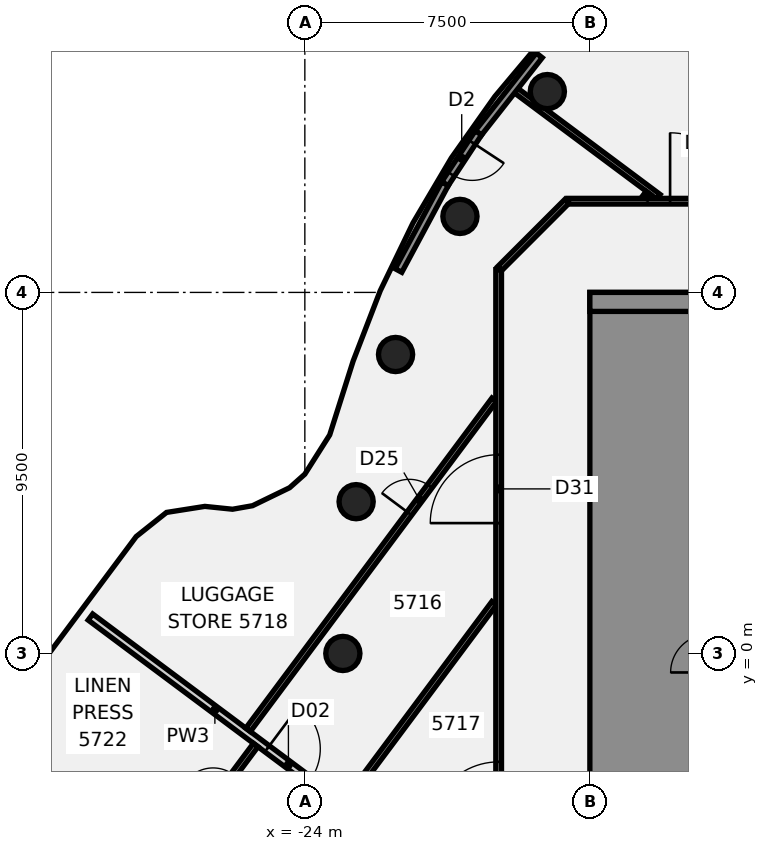
"""IFC4 building model, lengths in metres.
Left out: names, types, materials, properties, quantities, classifications, styles, units other than length and angle.
Written with IfcOpenShell. Run it as: python <this file> out.ifc"""

import sys

from ifc_helpers import new_model, si_unit, direction, frame, frame_2d, origin, origin_2d, place, context, subcontext, project, spatial, polyline, rectangle, circle, outline, extrude, element, fill, save


model = new_model("IFC4")
c1 = context("Model", 3, precision=1e-05, world=origin(), true_north=direction((0.0, 1.0)))
c2 = subcontext(c1, "Body", "Model", "MODEL_VIEW")
j1 = project(units=[si_unit("LENGTHUNIT", "METRE"), si_unit("PLANEANGLEUNIT", "RADIAN")], contexts=[c1])
p1 = place(None, origin())
s1 = spatial("IfcSite", under=j1, at=p1, CompositionType="ELEMENT")
p2 = place(p1, origin())
s2 = spatial("IfcBuilding", under=s1, at=p2, CompositionType="ELEMENT")
p3 = place(p2, frame((0.0, 0.0, 227.1)))
s3 = spatial("IfcBuildingStorey", under=s2, at=p3, CompositionType="ELEMENT", Elevation=227.1)
for number, where, z_axis, x_axis in (
    (1, (-17.619, 14.784, -0.14), (0.0, 0.0, 1.0), (1.0, 0.0, 0.0)),
    (2, (-19.919, 11.5, -0.14), (0.0, 0.0, 1.0), (1.0, 0.0, 0.0)),
    (3, (-21.613, 7.866, -0.14), (0.0, 0.0, 1.0), (1.0, 0.0, 0.0)),
    (4, (-22.651, 3.994, -0.14), (0.0, 0.0, 1.0), (1.0, 0.0, 0.0)),
    (5, (-23.0, 0.0, -0.14), (0.0, 0.0, 1.0), (1.0, 0.0, 0.0)),
):
    element("IfcColumn", number, at=place(p3, frame(where, z_axis=z_axis, x_axis=x_axis)), inside=s3, PredefinedType="COLUMN", context=c2, shape_type="SweptSolid", body=[
        extrude(circle(Radius=0.45, at=origin_2d()), origin(), (0.0, 0.0, 1.0), 3.6),
    ])
p4 = place(p3, frame((-29.642, 0.958, 0.0), z_axis=(0.0, 0.0, 1.0), x_axis=(0.801632086485, -0.597817696224, 0.0)))
e6 = element("IfcWall", 6, at=p4, inside=s3, PredefinedType="PARTITIONING", context=c2, shape_type="SweptSolid", body=[
    extrude(rectangle(XDim=8.171, YDim=0.2, at=frame_2d((4.085, 0.0))), origin(), (0.0, 0.0, 1.0), 2.864),
])
p5 = place(p4, frame((5.799, 0.0, 0.0)))
e7 = element("IfcOpeningElement", 7, at=p5, cuts=e6, PredefinedType="OPENING", context=c2, shape_type="SweptSolid", body=[
    extrude(rectangle(XDim=1.4, YDim=2.1, at=frame_2d((0.7, 1.05))), frame((0.0, 0.11, 0.0), z_axis=(0.0, -1.0, 0.0), x_axis=(1.0, 0.0, 0.0)), (0.0, 0.0, 1.0), 0.22),
])
p6 = place(p3, frame((-18.463, 14.827, 0.0), z_axis=(0.0, 0.0, 1.0), x_axis=(0.801555334436, -0.597920601617, 0.0)))
e8 = element("IfcWall", 8, at=p6, inside=s3, PredefinedType="PARTITIONING", context=c2, shape_type="SweptSolid", body=[
    extrude(rectangle(XDim=4.701, YDim=0.15, at=frame_2d((2.351, 0.0))), origin(), (0.0, 0.0, 1.0), 2.864),
])
p7 = place(p3, frame((-17.065, 11.9, 0.0), z_axis=(0.0, 0.0, 1.0), x_axis=(1.0, 0.0, 0.0)))
e9 = element("IfcWall", 9, at=p7, inside=s3, PredefinedType="PARTITIONING", context=c2, shape_type="SweptSolid", body=[
    extrude(rectangle(XDim=34.165, YDim=0.15, at=frame_2d((17.083, 0.0))), origin(), (0.0, 0.0, 1.0), 2.864),
])
p8 = place(p7, frame((24.517, 0.0, 0.0)))
e10 = element("IfcOpeningElement", 10, at=p8, cuts=e9, PredefinedType="OPENING", context=c2, shape_type="SweptSolid", body=[
    extrude(rectangle(XDim=1.8, YDim=2.1, at=frame_2d((0.9, 1.05))), frame((0.0, 0.085, 0.0), z_axis=(0.0, -1.0, 0.0), x_axis=(1.0, 0.0, 0.0)), (0.0, 0.0, 1.0), 0.17),
])
p9 = place(p7, frame((9.276, 0.0, 0.0)))
e11 = element("IfcOpeningElement", 11, at=p9, cuts=e9, PredefinedType="OPENING", context=c2, shape_type="SweptSolid", body=[
    extrude(rectangle(XDim=1.8, YDim=2.1, at=frame_2d((0.9, 1.05))), frame((0.0, 0.085, 0.0), z_axis=(0.0, -1.0, 0.0), x_axis=(1.0, 0.0, 0.0)), (0.0, 0.0, 1.0), 0.17),
])
p10 = place(p7, frame((2.676, 0.0, 0.0)))
e12 = element("IfcOpeningElement", 12, at=p10, cuts=e9, PredefinedType="OPENING", context=c2, shape_type="SweptSolid", body=[
    extrude(rectangle(XDim=1.8, YDim=2.1, at=frame_2d((0.9, 1.05))), frame((0.0, 0.085, 0.0), z_axis=(0.0, -1.0, 0.0), x_axis=(1.0, 0.0, 0.0)), (0.0, 0.0, 1.0), 0.17),
])
p11 = place(p3, frame((-18.872, 10.128, 0.0), z_axis=(0.0, 0.0, 1.0), x_axis=(0.707106781187, 0.707106781187, 0.0)))
e13 = element("IfcWall", 13, at=p11, inside=s3, PredefinedType="PARTITIONING", context=c2, shape_type="SweptSolid", body=[
    extrude(rectangle(XDim=2.505, YDim=0.15, at=frame_2d((1.253, 0.0))), origin(), (0.0, 0.0, 1.0), 2.864),
])
p12 = place(p3, frame((-27.58, -5.475, 0.0), z_axis=(0.0, 0.0, 1.0), x_axis=(0.597842652669, 0.801613474593, 0.0)))
e14 = element("IfcWall", 14, at=p12, inside=s3, PredefinedType="PARTITIONING", context=c2, shape_type="SweptSolid", body=[
    extrude(rectangle(XDim=3.824, YDim=0.15, at=frame_2d((1.912, 0.0))), origin(), (0.0, 0.0, 1.0), 2.864),
])
p13 = place(p12, frame((1.95, 0.0, 0.0)))
e15 = element("IfcOpeningElement", 15, at=p13, cuts=e14, PredefinedType="OPENING", context=c2, shape_type="SweptSolid", body=[
    extrude(rectangle(XDim=0.9, YDim=2.1, at=frame_2d((0.45, 1.05))), frame((0.0, 0.085, 0.0), z_axis=(0.0, -1.0, 0.0), x_axis=(1.0, 0.0, 0.0)), (0.0, 0.0, 1.0), 0.17),
])
p14 = place(p3, frame((-25.494, -2.01, 0.0), z_axis=(0.0, 0.0, 1.0), x_axis=(0.597791486565, 0.801651631689, 0.0)))
e16 = element("IfcWall", 16, at=p14, inside=s3, PredefinedType="PARTITIONING", context=c2, shape_type="SweptSolid", body=[
    extrude(rectangle(XDim=10.836, YDim=0.15, at=frame_2d((5.418, 0.0))), origin(), (0.0, 0.0, 1.0), 2.864),
])
p15 = place(p14, frame((7.1, 0.0, 0.0)))
e17 = element("IfcOpeningElement", 17, at=p15, cuts=e16, PredefinedType="OPENING", context=c2, shape_type="SweptSolid", body=[
    extrude(rectangle(XDim=0.9, YDim=2.1, at=frame_2d((0.45, 1.05))), frame((0.0, 0.085, 0.0), z_axis=(0.0, -1.0, 0.0), x_axis=(1.0, 0.0, 0.0)), (0.0, 0.0, 1.0), 0.17),
])
p16 = place(p3, frame((-15.047, 12.0, 0.0), z_axis=(0.0, 0.0, 1.0), x_axis=(0.598084412892, 0.801433113276, 0.0)))
e18 = element("IfcWall", 18, at=p16, inside=s3, PredefinedType="PARTITIONING", context=c2, shape_type="SweptSolid", body=[
    extrude(rectangle(XDim=0.143, YDim=0.15, at=frame_2d((0.071, 0.0))), origin(), (0.0, 0.0, 1.0), 2.864),
])
p17 = place(p3, frame((-22.641, -3.537, 0.0), z_axis=(0.0, 0.0, 1.0), x_axis=(0.597807213713, 0.801639903718, 0.0)))
e19 = element("IfcWall", 19, at=p17, inside=s3, PredefinedType="PARTITIONING", context=c2, shape_type="SweptSolid", body=[
    extrude(rectangle(XDim=6.063, YDim=0.15, at=frame_2d((3.031, 0.0))), origin(), (0.0, 0.0, 1.0), 2.864),
])
p18 = place(p3, frame((-18.9, -10.1, 0.0), z_axis=(0.0, 0.0, 1.0), x_axis=(0.0, 1.0, 0.0)))
e20 = element("IfcWall", 20, at=p18, inside=s3, PredefinedType="PARTITIONING", context=c2, shape_type="SweptSolid", body=[
    extrude(rectangle(XDim=20.2, YDim=0.15, at=frame_2d((10.1, 0.0))), origin(), (0.0, 0.0, 1.0), 2.864),
])
p19 = place(p18, frame((13.53, 0.0, 0.0)))
e21 = element("IfcOpeningElement", 21, at=p19, cuts=e20, PredefinedType="OPENING", context=c2, shape_type="SweptSolid", body=[
    extrude(rectangle(XDim=1.8, YDim=2.1, at=frame_2d((0.9, 1.05))), frame((0.0, 0.085, 0.0), z_axis=(0.0, -1.0, 0.0), x_axis=(1.0, 0.0, 0.0)), (0.0, 0.0, 1.0), 0.17),
])
p20 = place(p18, frame((5.448, 0.0, 0.0)))
e22 = element("IfcOpeningElement", 22, at=p20, cuts=e20, PredefinedType="OPENING", context=c2, shape_type="SweptSolid", body=[
    extrude(rectangle(XDim=1.8, YDim=2.1, at=frame_2d((0.9, 1.05))), frame((0.0, 0.085, 0.0), z_axis=(0.0, -1.0, 0.0), x_axis=(1.0, 0.0, 0.0)), (0.0, 0.0, 1.0), 0.17),
])
p21 = place(p3, frame((-17.831, 15.738, 0.0), z_axis=(0.0, 0.0, 1.0), x_axis=(-0.617667728479, -0.786439175776, 0.0)))
e23 = element("IfcWall", 23, at=p21, inside=s3, PredefinedType="SOLIDWALL", context=c2, shape_type="SweptSolid", body=[
    extrude(rectangle(XDim=2.594, YDim=0.2, at=frame_2d((1.297, 0.0))), origin(), (0.0, 0.0, 1.0), 3.46),
])
p22 = place(p3, frame((-20.312, 12.362, 0.0), z_axis=(0.0, 0.0, 1.0), x_axis=(-0.472487856135, -0.881337180541, 0.0)))
e24 = element("IfcWall", 24, at=p22, inside=s3, PredefinedType="SOLIDWALL", context=c2, shape_type="SweptSolid", body=[
    extrude(rectangle(XDim=2.593, YDim=0.2, at=frame_2d((1.297, 0.0))), origin(), (0.0, 0.0, 1.0), 3.46),
])
p23 = place(p3, frame((-19.433, 13.698, 0.0), z_axis=(0.0, 0.0, 1.0), x_axis=(-0.549473446393, -0.835511179883, 0.0)))
e25 = element("IfcWall", 25, at=p23, inside=s3, PredefinedType="SOLIDWALL", context=c2, shape_type="SweptSolid", body=[
    extrude(rectangle(XDim=1.599, YDim=0.2, at=frame_2d((0.799, 0.0))), origin(), (0.0, 0.0, 1.0), 3.46),
])
p24 = place(p23, frame((0.299, 0.0, 0.0)))
e26 = element("IfcOpeningElement", 26, at=p24, cuts=e25, PredefinedType="OPENING", context=c2, shape_type="SweptSolid", body=[
    extrude(rectangle(XDim=1.0, YDim=2.4, at=frame_2d((0.5, 1.2))), frame((0.0, 0.11, 0.0), z_axis=(0.0, -1.0, 0.0), x_axis=(1.0, 0.0, 0.0)), (0.0, 0.0, 1.0), 0.22),
])
p25 = place(p3, origin())
e27 = element("IfcWall", 27, at=p25, inside=s3, PredefinedType="SHEAR", context=c2, shape_type="SweptSolid", body=[
    extrude(outline(polyline([(-13.5, -8.125), (-16.0, -8.125), (-16.0, -5.625), (-13.5, -5.625), (-13.5, -5.375), (-16.0, -5.375), (-16.0, 5.375), (-13.5, 5.375), (-13.5, 5.625), (-16.0, 5.625), (-16.0, 8.125), (-13.5, 8.125), (-13.5, 9.0), (-16.0, 9.0), (-16.5, 9.0), (-16.5, -9.0), (-16.0, -9.0), (-13.5, -9.0), (-13.5, -8.125)])), origin(), (0.0, 0.0, 1.0), 3.46),
])
p26 = place(p3, frame((-16.5, 9.25, 0.0), z_axis=(0.0, 0.0, 1.0), x_axis=(1.0, 0.0, 0.0)))
e28 = element("IfcWall", 28, at=p26, inside=s3, PredefinedType="SHEAR", context=c2, shape_type="SweptSolid", body=[
    extrude(rectangle(XDim=13.0, YDim=0.5, at=frame_2d((6.5, 0.0))), origin(), (0.0, 0.0, 1.0), 3.46),
])
p27 = place(p5, origin())
e29 = element("IfcDoor", 29, at=p27, inside=s3, OperationType="DOUBLE_DOOR_SINGLE_SWING", PredefinedType="DOOR", context=c2, shape_type="SweptSolid", body=[
    extrude(rectangle(XDim=1.4, YDim=2.1, at=frame_2d((0.7, 1.05))), frame((0.0, 0.025, 0.0), z_axis=(0.0, -1.0, 0.0), x_axis=(1.0, 0.0, 0.0)), (0.0, 0.0, 1.0), 0.05),
])
fill(e7, e29)
p28 = place(p10, origin())
e30 = element("IfcDoor", 30, at=p28, inside=s3, OperationType="DOUBLE_DOOR_SINGLE_SWING", PredefinedType="DOOR", context=c2, shape_type="SweptSolid", body=[
    extrude(rectangle(XDim=1.8, YDim=2.1, at=frame_2d((0.9, 1.05))), frame((0.0, 0.025, 0.0), z_axis=(0.0, -1.0, 0.0), x_axis=(1.0, 0.0, 0.0)), (0.0, 0.0, 1.0), 0.05),
])
fill(e12, e30)
p29 = place(p15, origin())
e31 = element("IfcDoor", 31, at=p29, inside=s3, OperationType="SINGLE_SWING_LEFT", PredefinedType="DOOR", context=c2, shape_type="SweptSolid", body=[
    extrude(rectangle(XDim=0.9, YDim=2.1, at=frame_2d((0.45, 1.05))), frame((0.0, 0.025, 0.0), z_axis=(0.0, -1.0, 0.0), x_axis=(1.0, 0.0, 0.0)), (0.0, 0.0, 1.0), 0.05),
])
fill(e17, e31)
p30 = place(p19, frame((1.8, 0.0, 0.0), z_axis=(0.0, 0.0, 1.0), x_axis=(-1.0, 0.0, 0.0)))
e32 = element("IfcDoor", 32, at=p30, inside=s3, OperationType="DOUBLE_DOOR_SINGLE_SWING", PredefinedType="DOOR", context=c2, shape_type="SweptSolid", body=[
    extrude(rectangle(XDim=1.8, YDim=2.1, at=frame_2d((0.9, 1.05))), frame((0.0, 0.025, 0.0), z_axis=(0.0, -1.0, 0.0), x_axis=(1.0, 0.0, 0.0)), (0.0, 0.0, 1.0), 0.05),
])
fill(e21, e32)
p31 = place(p20, origin())
e33 = element("IfcDoor", 33, at=p31, inside=s3, OperationType="DOUBLE_DOOR_SINGLE_SWING", PredefinedType="DOOR", context=c2, shape_type="SweptSolid", body=[
    extrude(rectangle(XDim=1.8, YDim=2.1, at=frame_2d((0.9, 1.05))), frame((0.0, 0.025, 0.0), z_axis=(0.0, -1.0, 0.0), x_axis=(1.0, 0.0, 0.0)), (0.0, 0.0, 1.0), 0.05),
])
fill(e22, e33)
p32 = place(p24, origin())
e34 = element("IfcDoor", 34, at=p32, inside=s3, OperationType="SINGLE_SWING_LEFT", PredefinedType="DOOR", context=c2, shape_type="SweptSolid", body=[
    extrude(rectangle(XDim=1.0, YDim=2.4, at=frame_2d((0.5, 1.2))), frame((0.0, 0.025, 0.0), z_axis=(0.0, -1.0, 0.0), x_axis=(1.0, 0.0, 0.0)), (0.0, 0.0, 1.0), 0.05),
])
fill(e26, e34)
save(model, sys.argv[1])
